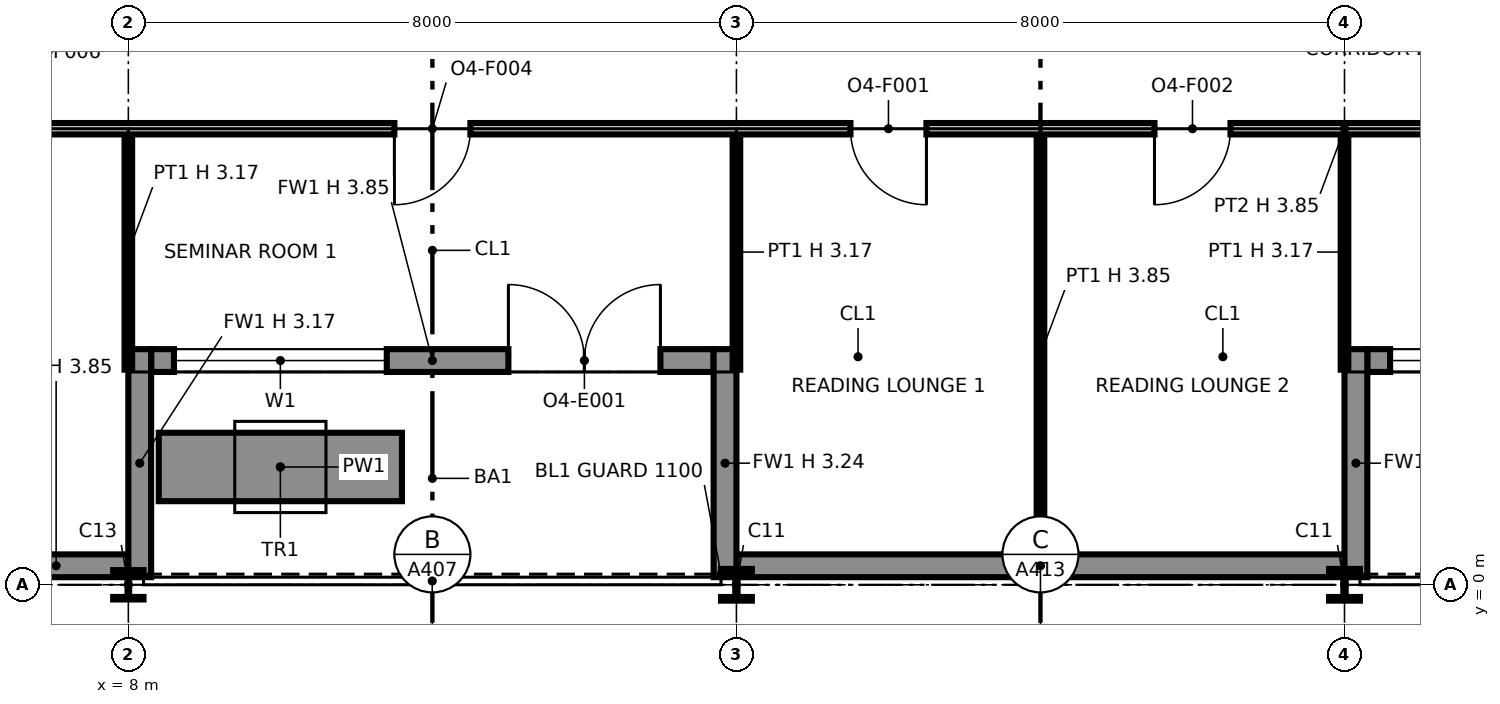
"""IFC4 building model, lengths in metres.
Left out: names, types, materials, properties, quantities, classifications, styles, units other than length and angle.
Written with IfcOpenShell. Run it as: python <this file> out.ifc"""

import sys

from ifc_helpers import new_model, si_unit, direction, frame, frame_2d, origin, origin_2d, place, context, subcontext, project, spatial, polyline, rectangle, i_section, outline, extrude, element, fill, save


model = new_model("IFC4")
c1 = context("Model", 3, precision=1e-05, world=origin(), true_north=direction((0.0, 1.0)))
c2 = subcontext(c1, "Body", "Model", "MODEL_VIEW")
j1 = project(units=[si_unit("LENGTHUNIT", "METRE"), si_unit("PLANEANGLEUNIT", "RADIAN")], contexts=[c1])
p1 = place(None, origin())
s1 = spatial("IfcSite", under=j1, at=p1, CompositionType="ELEMENT")
p2 = place(p1, origin())
s2 = spatial("IfcBuilding", under=s1, at=p2, CompositionType="ELEMENT")
p3 = place(p2, frame((0.0, 0.0, 217.0)))
s3 = spatial("IfcBuildingStorey", under=s2, at=p3, CompositionType="ELEMENT", Elevation=217.0)
p4 = place(p3, frame((8.0, 0.0, 0.0), z_axis=(0.0, 0.0, 1.0), x_axis=(1.0, 0.0, 0.0)))
e1 = element("IfcColumn", 1, at=p4, inside=s3, PredefinedType="COLUMN", context=c2, shape_type="SweptSolid", body=[
    extrude(i_section(OverallWidth=0.399, OverallDepth=0.386, WebThickness=0.021, FlangeThickness=0.033, at=origin_2d()), origin(), (0.0, 0.0, 1.0), 3.85),
])
for number, where, z_axis, x_axis in (
    (2, (16.0, 0.0, 0.0), (0.0, 0.0, 1.0), (1.0, 0.0, 0.0)),
    (3, (24.0, 0.0, 0.0), (0.0, 0.0, 1.0), (1.0, 0.0, 0.0)),
):
    element("IfcColumn", number, at=place(p3, frame(where, z_axis=z_axis, x_axis=x_axis)), inside=s3, PredefinedType="COLUMN", context=c2, shape_type="SweptSolid", body=[
        extrude(i_section(OverallWidth=0.406, OverallDepth=0.417, WebThickness=0.03, FlangeThickness=0.048, at=origin_2d()), origin(), (0.0, 0.0, 1.0), 3.85),
    ])
p5 = place(p3, frame((6.1, 0.25, 0.0), z_axis=(0.0, 0.0, 1.0), x_axis=(1.0, 0.0, 0.0)))
e4 = element("IfcWall", 4, at=p5, inside=s3, PredefinedType="SOLIDWALL", context=c2, shape_type="SweptSolid", body=[
    extrude(rectangle(XDim=1.9, YDim=0.3, at=frame_2d((0.95, 0.0))), origin(), (0.0, 0.0, 1.0), 3.85),
])
p6 = place(p3, frame((8.3, 2.95, 0.0), z_axis=(0.0, 0.0, 1.0), x_axis=(1.0, 0.0, 0.0)))
e5 = element("IfcWall", 5, at=p6, inside=s3, PredefinedType="SOLIDWALL", context=c2, shape_type="SweptSolid", body=[
    extrude(rectangle(XDim=7.4, YDim=0.3, at=frame_2d((3.7, 0.0))), origin(), (0.0, 0.0, 1.0), 3.85),
])
p7 = place(p6, frame((0.3, 0.0, 0.9)))
e6 = element("IfcOpeningElement", 6, at=p7, cuts=e5, PredefinedType="OPENING", context=c2, shape_type="SweptSolid", body=[
    extrude(rectangle(XDim=2.8, YDim=2.2, at=frame_2d((1.4, 1.1))), frame((0.0, 0.16, 0.0), z_axis=(0.0, -1.0, 0.0), x_axis=(1.0, 0.0, 0.0)), (0.0, 0.0, 1.0), 0.32),
])
p8 = place(p6, frame((4.7, 0.0, 0.0)))
e7 = element("IfcOpeningElement", 7, at=p8, cuts=e5, PredefinedType="OPENING", context=c2, shape_type="SweptSolid", body=[
    extrude(rectangle(XDim=2.0, YDim=2.4, at=frame_2d((1.0, 1.2))), frame((0.0, 0.16, 0.0), z_axis=(0.0, -1.0, 0.0), x_axis=(1.0, 0.0, 0.0)), (0.0, 0.0, 1.0), 0.32),
])
p9 = place(p3, frame((8.15, 0.1, 0.0), z_axis=(0.0, 0.0, 1.0), x_axis=(0.0, 1.0, 0.0)))
e8 = element("IfcWall", 8, at=p9, inside=s3, PredefinedType="SOLIDWALL", context=c2, shape_type="SweptSolid", body=[
    extrude(rectangle(XDim=3.0, YDim=0.3, at=frame_2d((1.5, 0.0))), origin(), (0.0, 0.0, 1.0), 3.171),
])
p10 = place(p3, frame((15.85, 0.1, 0.0), z_axis=(0.0, 0.0, 1.0), x_axis=(0.0, 1.0, 0.0)))
e9 = element("IfcWall", 9, at=p10, inside=s3, PredefinedType="SOLIDWALL", context=c2, shape_type="SweptSolid", body=[
    extrude(rectangle(XDim=3.0, YDim=0.3, at=frame_2d((1.5, 0.0))), origin(), (0.0, 0.0, 1.0), 3.237),
])
p11 = place(p3, frame((16.0, 0.25, 0.0), z_axis=(0.0, 0.0, 1.0), x_axis=(1.0, 0.0, 0.0)))
e10 = element("IfcWall", 10, at=p11, inside=s3, PredefinedType="SOLIDWALL", context=c2, shape_type="SweptSolid", body=[
    extrude(rectangle(XDim=8.0, YDim=0.3, at=frame_2d((4.0, 0.0))), origin(), (0.0, 0.0, 1.0), 3.85),
])
p12 = place(p3, frame((24.3, 2.95, 0.0), z_axis=(0.0, 0.0, 1.0), x_axis=(1.0, 0.0, 0.0)))
e11 = element("IfcWall", 11, at=p12, inside=s3, PredefinedType="SOLIDWALL", context=c2, shape_type="SweptSolid", body=[
    extrude(rectangle(XDim=7.4, YDim=0.3, at=frame_2d((3.7, 0.0))), origin(), (0.0, 0.0, 1.0), 3.85),
])
p13 = place(p12, frame((0.3, 0.0, 0.9)))
e12 = element("IfcOpeningElement", 12, at=p13, cuts=e11, PredefinedType="OPENING", context=c2, shape_type="SweptSolid", body=[
    extrude(rectangle(XDim=2.8, YDim=2.2, at=frame_2d((1.4, 1.1))), frame((0.0, 0.16, 0.0), z_axis=(0.0, -1.0, 0.0), x_axis=(1.0, 0.0, 0.0)), (0.0, 0.0, 1.0), 0.32),
])
p14 = place(p12, frame((4.7, 0.0, 0.0)))
e13 = element("IfcOpeningElement", 13, at=p14, cuts=e11, PredefinedType="OPENING", context=c2, shape_type="SweptSolid", body=[
    extrude(rectangle(XDim=2.0, YDim=2.4, at=frame_2d((1.0, 1.2))), frame((0.0, 0.16, 0.0), z_axis=(0.0, -1.0, 0.0), x_axis=(1.0, 0.0, 0.0)), (0.0, 0.0, 1.0), 0.32),
])
p15 = place(p3, frame((24.15, 0.1, 0.0), z_axis=(0.0, 0.0, 1.0), x_axis=(0.0, 1.0, 0.0)))
e14 = element("IfcWall", 14, at=p15, inside=s3, PredefinedType="SOLIDWALL", context=c2, shape_type="SweptSolid", body=[
    extrude(rectangle(XDim=3.0, YDim=0.3, at=frame_2d((1.5, 0.0))), origin(), (0.0, 0.0, 1.0), 3.237),
])
p16 = place(p3, frame((8.4, 1.55, 0.0), z_axis=(0.0, 0.0, 1.0), x_axis=(1.0, 0.0, 0.0)))
e15 = element("IfcWall", 15, at=p16, inside=s3, PredefinedType="SOLIDWALL", context=c2, shape_type="SweptSolid", body=[
    extrude(rectangle(XDim=3.2, YDim=0.9, at=frame_2d((1.6, 0.0))), origin(), (0.0, 0.0, 1.0), 0.6),
])
p17 = place(p3, frame((20.0, 0.13, 0.0), z_axis=(0.0, 0.0, 1.0), x_axis=(0.0, 1.0, 0.0)))
e16 = element("IfcWall", 16, at=p17, inside=s3, PredefinedType="PARTITIONING", context=c2, shape_type="SweptSolid", body=[
    extrude(outline(polyline([(0.0, 0.0), (5.795, 0.0), (5.795, 3.85), (4.17, 3.85), (4.168, 3.172), (3.572, 3.172), (3.57, 3.85), (0.0, 3.85), (0.0, 0.0)])), frame((0.0, 0.05, 0.0), z_axis=(0.0, -1.0, 0.0), x_axis=(1.0, 0.0, 0.0)), (0.0, 0.0, 1.0), 0.1),
])
for number, where, z_axis, x_axis in (
    (17, (8.0, 2.83, 0.0), (0.0, 0.0, 1.0), (0.0, 1.0, 0.0)),
    (18, (16.0, 2.83, 0.0), (0.0, 0.0, 1.0), (0.0, 1.0, 0.0)),
    (19, (24.0, 2.83, 0.0), (0.0, 0.0, 1.0), (0.0, 1.0, 0.0)),
):
    element("IfcWall", number, at=place(p3, frame(where, z_axis=z_axis, x_axis=x_axis)), inside=s3, PredefinedType="PARTITIONING", context=c2, shape_type="SweptSolid", body=[
        extrude(rectangle(XDim=3.095, YDim=0.1, at=frame_2d((1.547, 0.0))), origin(), (0.0, 0.0, 1.0), 3.172),
    ])
p18 = place(p3, frame((6.075, 6.0, 0.0), z_axis=(0.0, 0.0, 1.0), x_axis=(1.0, 0.0, 0.0)))
e20 = element("IfcWall", 20, at=p18, inside=s3, PredefinedType="PARTITIONING", context=c2, shape_type="SweptSolid", body=[
    extrude(rectangle(XDim=35.85, YDim=0.15, at=frame_2d((17.925, 0.0))), origin(), (0.0, 0.0, 1.0), 3.85),
])
p19 = place(p18, frame((12.425, 0.0, 0.0), z_axis=(0.0, 0.0, 1.0), x_axis=(-1.0, 0.0, 0.0)))
e21 = element("IfcOpeningElement", 21, at=p19, cuts=e20, PredefinedType="OPENING", context=c2, shape_type="SweptSolid", body=[
    extrude(rectangle(XDim=1.0, YDim=2.1, at=frame_2d((0.5, 1.05))), frame((0.0, 0.085, 0.0), z_axis=(0.0, -1.0, 0.0), x_axis=(1.0, 0.0, 0.0)), (0.0, 0.0, 1.0), 0.17),
])
p20 = place(p18, frame((16.425, 0.0, 0.0), z_axis=(0.0, 0.0, 1.0), x_axis=(-1.0, 0.0, 0.0)))
e22 = element("IfcOpeningElement", 22, at=p20, cuts=e20, PredefinedType="OPENING", context=c2, shape_type="SweptSolid", body=[
    extrude(rectangle(XDim=1.0, YDim=2.1, at=frame_2d((0.5, 1.05))), frame((0.0, 0.085, 0.0), z_axis=(0.0, -1.0, 0.0), x_axis=(1.0, 0.0, 0.0)), (0.0, 0.0, 1.0), 0.17),
])
p21 = place(p18, frame((30.425, 0.0, 0.0), z_axis=(0.0, 0.0, 1.0), x_axis=(-1.0, 0.0, 0.0)))
e23 = element("IfcOpeningElement", 23, at=p21, cuts=e20, PredefinedType="OPENING", context=c2, shape_type="SweptSolid", body=[
    extrude(rectangle(XDim=1.0, YDim=2.1, at=frame_2d((0.5, 1.05))), frame((0.0, 0.085, 0.0), z_axis=(0.0, -1.0, 0.0), x_axis=(1.0, 0.0, 0.0)), (0.0, 0.0, 1.0), 0.17),
])
p22 = place(p18, frame((6.425, 0.0, 0.0), z_axis=(0.0, 0.0, 1.0), x_axis=(-1.0, 0.0, 0.0)))
e24 = element("IfcOpeningElement", 24, at=p22, cuts=e20, PredefinedType="OPENING", context=c2, shape_type="SweptSolid", body=[
    extrude(rectangle(XDim=1.0, YDim=2.1, at=frame_2d((0.5, 1.05))), frame((0.0, 0.085, 0.0), z_axis=(0.0, -1.0, 0.0), x_axis=(1.0, 0.0, 0.0)), (0.0, 0.0, 1.0), 0.17),
])
p23 = place(p18, frame((23.425, 0.0, 0.0), z_axis=(0.0, 0.0, 1.0), x_axis=(-1.0, 0.0, 0.0)))
e25 = element("IfcOpeningElement", 25, at=p23, cuts=e20, PredefinedType="OPENING", context=c2, shape_type="SweptSolid", body=[
    extrude(rectangle(XDim=1.0, YDim=2.1, at=frame_2d((0.5, 1.05))), frame((0.0, 0.085, 0.0), z_axis=(0.0, -1.0, 0.0), x_axis=(1.0, 0.0, 0.0)), (0.0, 0.0, 1.0), 0.17),
])
p24 = place(p18, frame((35.425, 0.0, 0.0), z_axis=(0.0, 0.0, 1.0), x_axis=(-1.0, 0.0, 0.0)))
e26 = element("IfcOpeningElement", 26, at=p24, cuts=e20, PredefinedType="OPENING", context=c2, shape_type="SweptSolid", body=[
    extrude(rectangle(XDim=1.0, YDim=2.1, at=frame_2d((0.5, 1.05))), frame((0.0, 0.085, 0.0), z_axis=(0.0, -1.0, 0.0), x_axis=(1.0, 0.0, 0.0)), (0.0, 0.0, 1.0), 0.17),
])
p25 = place(p7, origin())
e27 = element("IfcWindow", 27, at=p25, inside=s3, PartitioningType="SINGLE_PANEL", PredefinedType="WINDOW", context=c2, shape_type="SweptSolid", body=[
    extrude(rectangle(XDim=2.8, YDim=2.2, at=frame_2d((1.4, 1.1))), frame((0.0, 0.03, 0.0), z_axis=(0.0, -1.0, 0.0), x_axis=(1.0, 0.0, 0.0)), (0.0, 0.0, 1.0), 0.06),
])
fill(e6, e27)
p26 = place(p8, origin())
e28 = element("IfcDoor", 28, at=p26, inside=s3, OperationType="DOUBLE_DOOR_SINGLE_SWING", PredefinedType="DOOR", context=c2, shape_type="SweptSolid", body=[
    extrude(rectangle(XDim=2.0, YDim=2.4, at=frame_2d((1.0, 1.2))), frame((0.0, 0.025, 0.0), z_axis=(0.0, -1.0, 0.0), x_axis=(1.0, 0.0, 0.0)), (0.0, 0.0, 1.0), 0.05),
])
fill(e7, e28)
p27 = place(p13, origin())
e29 = element("IfcWindow", 29, at=p27, inside=s3, PartitioningType="SINGLE_PANEL", PredefinedType="WINDOW", context=c2, shape_type="SweptSolid", body=[
    extrude(rectangle(XDim=2.8, YDim=2.2, at=frame_2d((1.4, 1.1))), frame((0.0, 0.03, 0.0), z_axis=(0.0, -1.0, 0.0), x_axis=(1.0, 0.0, 0.0)), (0.0, 0.0, 1.0), 0.06),
])
fill(e12, e29)
p28 = place(p19, origin())
e30 = element("IfcDoor", 30, at=p28, inside=s3, OperationType="SINGLE_SWING_LEFT", PredefinedType="DOOR", context=c2, shape_type="SweptSolid", body=[
    extrude(rectangle(XDim=1.0, YDim=2.1, at=frame_2d((0.5, 1.05))), frame((0.0, 0.025, 0.0), z_axis=(0.0, -1.0, 0.0), x_axis=(1.0, 0.0, 0.0)), (0.0, 0.0, 1.0), 0.05),
])
fill(e21, e30)
p29 = place(p20, origin())
e31 = element("IfcDoor", 31, at=p29, inside=s3, OperationType="SINGLE_SWING_RIGHT", PredefinedType="DOOR", context=c2, shape_type="SweptSolid", body=[
    extrude(rectangle(XDim=1.0, YDim=2.1, at=frame_2d((0.5, 1.05))), frame((0.0, 0.025, 0.0), z_axis=(0.0, -1.0, 0.0), x_axis=(1.0, 0.0, 0.0)), (0.0, 0.0, 1.0), 0.05),
])
fill(e22, e31)
p30 = place(p22, origin())
e32 = element("IfcDoor", 32, at=p30, inside=s3, OperationType="SINGLE_SWING_RIGHT", PredefinedType="DOOR", context=c2, shape_type="SweptSolid", body=[
    extrude(rectangle(XDim=1.0, YDim=2.1, at=frame_2d((0.5, 1.05))), frame((0.0, 0.025, 0.0), z_axis=(0.0, -1.0, 0.0), x_axis=(1.0, 0.0, 0.0)), (0.0, 0.0, 1.0), 0.05),
])
fill(e24, e32)
save(model, sys.argv[1])
